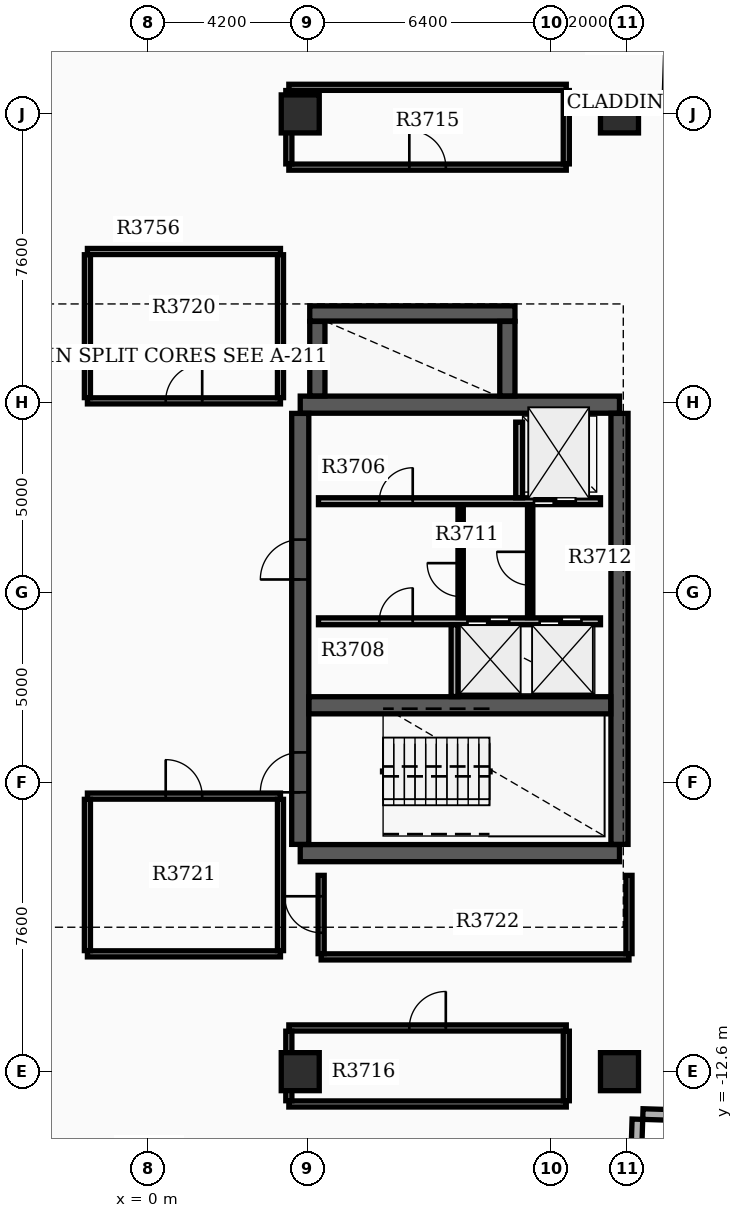
"""IFC4 building model, lengths in metres.
Left out: names, types, materials, properties, quantities, classifications, styles, units other than length and angle.
Written with IfcOpenShell. Run it as: python <this file> out.ifc"""

import sys

from ifc_helpers import new_model, si_unit, direction, frame, frame_2d, origin, origin_2d, place, context, subcontext, project, spatial, rectangle, extrude, element, fill, save


model = new_model("IFC4")
c1 = context("Model", 3, precision=1e-05, world=origin(), true_north=direction((0.0, 1.0)))
c2 = subcontext(c1, "Body", "Model", "MODEL_VIEW")
j1 = project(units=[si_unit("LENGTHUNIT", "METRE"), si_unit("PLANEANGLEUNIT", "RADIAN")], contexts=[c1])
p1 = place(None, origin())
s1 = spatial("IfcSite", under=j1, at=p1, CompositionType="ELEMENT")
p2 = place(p1, origin())
s2 = spatial("IfcBuilding", under=s1, at=p2, CompositionType="ELEMENT")
p3 = place(p2, frame((0.0, 0.0, 232.5)))
s3 = spatial("IfcBuildingStorey", under=s2, at=p3, CompositionType="ELEMENT", Elevation=232.5)
for number, where, z_axis, x_axis in (
    (1, (4.0, -6.85, 0.0), (0.0, 0.0, 1.0), (1.0, 0.0, 0.0)),
    (2, (4.0, 4.95, 0.0), (0.0, 0.0, 1.0), (1.0, 0.0, 0.0)),
):
    element("IfcWall", number, at=place(p3, frame(where, z_axis=z_axis, x_axis=x_axis)), inside=s3, PredefinedType="SHEAR", context=c2, shape_type="SweptSolid", body=[
        extrude(rectangle(XDim=8.4, YDim=0.45, at=frame_2d((4.2, 0.0))), origin(), (0.0, 0.0, 1.0), 3.7),
    ])
p4 = place(p3, frame((4.0, -6.62, 0.0), z_axis=(0.0, 0.0, 1.0), x_axis=(0.0, 1.0, 0.0)))
e3 = element("IfcWall", 3, at=p4, inside=s3, PredefinedType="SHEAR", context=c2, shape_type="SweptSolid", body=[
    extrude(rectangle(XDim=11.34, YDim=0.45, at=frame_2d((5.67, 0.0))), origin(), (0.0, 0.0, 1.0), 3.7),
])
p5 = place(p4, frame((1.37, 0.0, 0.0)))
e4 = element("IfcOpeningElement", 4, at=p5, cuts=e3, PredefinedType="OPENING", context=c2, shape_type="SweptSolid", body=[
    extrude(rectangle(XDim=1.05, YDim=2.15, at=frame_2d((0.525, 1.075))), frame((0.0, 0.235, 0.0), z_axis=(0.0, -1.0, 0.0), x_axis=(1.0, 0.0, 0.0)), (0.0, 0.0, 1.0), 0.47),
])
p6 = place(p4, frame((6.97, 0.0, 0.0)))
e5 = element("IfcOpeningElement", 5, at=p6, cuts=e3, PredefinedType="OPENING", context=c2, shape_type="SweptSolid", body=[
    extrude(rectangle(XDim=1.05, YDim=2.15, at=frame_2d((0.525, 1.075))), frame((0.0, 0.235, 0.0), z_axis=(0.0, -1.0, 0.0), x_axis=(1.0, 0.0, 0.0)), (0.0, 0.0, 1.0), 0.47),
])
p7 = place(p3, frame((12.4, -6.62, 0.0), z_axis=(0.0, 0.0, 1.0), x_axis=(0.0, 1.0, 0.0)))
e6 = element("IfcWall", 6, at=p7, inside=s3, PredefinedType="SHEAR", context=c2, shape_type="SweptSolid", body=[
    extrude(rectangle(XDim=11.34, YDim=0.45, at=frame_2d((5.67, 0.0))), origin(), (0.0, 0.0, 1.0), 3.7),
])
p8 = place(p3, frame((4.23, -2.96, 0.0), z_axis=(0.0, 0.0, 1.0), x_axis=(1.0, 0.0, 0.0)))
e7 = element("IfcWall", 7, at=p8, inside=s3, PredefinedType="SHEAR", context=c2, shape_type="SweptSolid", body=[
    extrude(rectangle(XDim=7.94, YDim=0.45, at=frame_2d((3.97, 0.0))), origin(), (0.0, 0.0, 1.0), 3.7),
])
p9 = place(p3, frame((4.45, 5.18, 0.0), z_axis=(0.0, 0.0, 1.0), x_axis=(0.0, 1.0, 0.0)))
e8 = element("IfcWall", 8, at=p9, inside=s3, PredefinedType="SHEAR", context=c2, shape_type="SweptSolid", body=[
    extrude(rectangle(XDim=1.96, YDim=0.4, at=frame_2d((0.98, 0.0))), origin(), (0.0, 0.0, 1.0), 3.7),
])
p10 = place(p3, frame((4.25, 7.35, 0.0), z_axis=(0.0, 0.0, 1.0), x_axis=(1.0, 0.0, 0.0)))
e9 = element("IfcWall", 9, at=p10, inside=s3, PredefinedType="SHEAR", context=c2, shape_type="SweptSolid", body=[
    extrude(rectangle(XDim=5.4, YDim=0.4, at=frame_2d((2.7, 0.0))), origin(), (0.0, 0.0, 1.0), 3.7),
])
p11 = place(p3, frame((9.45, 5.18, 0.0), z_axis=(0.0, 0.0, 1.0), x_axis=(0.0, 1.0, 0.0)))
e10 = element("IfcWall", 10, at=p11, inside=s3, PredefinedType="SHEAR", context=c2, shape_type="SweptSolid", body=[
    extrude(rectangle(XDim=1.96, YDim=0.4, at=frame_2d((0.98, 0.0))), origin(), (0.0, 0.0, 1.0), 3.7),
])
for number, where, z_axis, x_axis in (
    (11, (12.4, -12.6, 0.0), (0.0, 0.0, 1.0), (1.0, 0.0, 0.0)),
    (12, (12.4, 12.6, 0.0), (0.0, 0.0, 1.0), (1.0, 0.0, 0.0)),
    (13, (4.0, -12.6, 0.0), (0.0, 0.0, 1.0), (1.0, 0.0, 0.0)),
    (14, (4.0, 12.6, 0.0), (0.0, 0.0, 1.0), (1.0, 0.0, 0.0)),
):
    element("IfcColumn", number, at=place(p3, frame(where, z_axis=z_axis, x_axis=x_axis)), inside=s3, PredefinedType="COLUMN", context=c2, shape_type="SweptSolid", body=[
        extrude(rectangle(XDim=1.0, YDim=1.0, at=origin_2d()), origin(), (0.0, 0.0, 1.0), 3.9),
    ])
p12 = place(p3, frame((14.235, -13.754, 0.0), z_axis=(0.0, 0.0, 1.0), x_axis=(-0.999506398264, 0.031415916822, 0.0)))
e15 = element("IfcWall", 15, at=p12, inside=s3, PredefinedType="STANDARD", context=c2, shape_type="SweptSolid", body=[
    extrude(rectangle(XDim=1.22, YDim=0.28, at=frame_2d((0.61, 0.0))), origin(), (0.0, 0.0, 1.0), 3.18),
])
p13 = place(p3, frame((12.871, -13.851, 0.0), z_axis=(0.0, 0.0, 1.0), x_axis=(-0.031412596484, -0.999506502621, 0.0)))
e16 = element("IfcWall", 16, at=p13, inside=s3, PredefinedType="STANDARD", context=c2, shape_type="SweptSolid", body=[
    extrude(rectangle(XDim=1.5, YDim=0.28, at=frame_2d((0.75, 0.0))), origin(), (0.0, 0.0, 1.0), 3.18),
])
p14 = place(p3, frame((4.48, 2.41, 0.0), z_axis=(0.0, 0.0, 1.0), x_axis=(1.0, 0.0, 0.0)))
e17 = element("IfcWall", 17, at=p14, inside=s3, PredefinedType="SOLIDWALL", context=c2, shape_type="SweptSolid", body=[
    extrude(rectangle(XDim=7.42, YDim=0.18, at=frame_2d((3.71, 0.0))), origin(), (0.0, 0.0, 1.0), 3.17),
])
p15 = place(p14, frame((5.67, 0.0, 0.0)))
e18 = element("IfcOpeningElement", 18, at=p15, cuts=e17, PredefinedType="OPENING", context=c2, shape_type="SweptSolid", body=[
    extrude(rectangle(XDim=1.1, YDim=2.15, at=frame_2d((0.55, 1.075))), frame((0.0, 0.1, 0.0), z_axis=(0.0, -1.0, 0.0), x_axis=(1.0, 0.0, 0.0)), (0.0, 0.0, 1.0), 0.2),
])
p16 = place(p14, frame((1.6, 0.0, 0.0)))
e19 = element("IfcOpeningElement", 19, at=p16, cuts=e17, PredefinedType="OPENING", context=c2, shape_type="SweptSolid", body=[
    extrude(rectangle(XDim=0.88, YDim=2.1, at=frame_2d((0.44, 1.05))), frame((0.0, 0.1, 0.0), z_axis=(0.0, -1.0, 0.0), x_axis=(1.0, 0.0, 0.0)), (0.0, 0.0, 1.0), 0.2),
])
p17 = place(p3, frame((4.48, -0.75, 0.0), z_axis=(0.0, 0.0, 1.0), x_axis=(1.0, 0.0, 0.0)))
e20 = element("IfcWall", 20, at=p17, inside=s3, PredefinedType="SOLIDWALL", context=c2, shape_type="SweptSolid", body=[
    extrude(rectangle(XDim=7.42, YDim=0.18, at=frame_2d((3.71, 0.0))), origin(), (0.0, 0.0, 1.0), 3.17),
])
p18 = place(p17, frame((3.92, 0.0, 0.0)))
e21 = element("IfcOpeningElement", 21, at=p18, cuts=e20, PredefinedType="OPENING", context=c2, shape_type="SweptSolid", body=[
    extrude(rectangle(XDim=1.1, YDim=2.15, at=frame_2d((0.55, 1.075))), frame((0.0, 0.1, 0.0), z_axis=(0.0, -1.0, 0.0), x_axis=(1.0, 0.0, 0.0)), (0.0, 0.0, 1.0), 0.2),
])
p19 = place(p17, frame((5.82, 0.0, 0.0)))
e22 = element("IfcOpeningElement", 22, at=p19, cuts=e20, PredefinedType="OPENING", context=c2, shape_type="SweptSolid", body=[
    extrude(rectangle(XDim=1.1, YDim=2.15, at=frame_2d((0.55, 1.075))), frame((0.0, 0.1, 0.0), z_axis=(0.0, -1.0, 0.0), x_axis=(1.0, 0.0, 0.0)), (0.0, 0.0, 1.0), 0.2),
])
p20 = place(p17, frame((1.6, 0.0, 0.0)))
e23 = element("IfcOpeningElement", 23, at=p20, cuts=e20, PredefinedType="OPENING", context=c2, shape_type="SweptSolid", body=[
    extrude(rectangle(XDim=0.88, YDim=2.1, at=frame_2d((0.44, 1.05))), frame((0.0, 0.1, 0.0), z_axis=(0.0, -1.0, 0.0), x_axis=(1.0, 0.0, 0.0)), (0.0, 0.0, 1.0), 0.2),
])
p21 = place(p3, frame((9.76, 2.5, 0.0), z_axis=(0.0, 0.0, 1.0), x_axis=(0.0, 1.0, 0.0)))
e24 = element("IfcWall", 24, at=p21, inside=s3, PredefinedType="SOLIDWALL", context=c2, shape_type="SweptSolid", body=[
    extrude(rectangle(XDim=1.99, YDim=0.18, at=frame_2d((0.995, 0.0))), origin(), (0.0, 0.0, 1.0), 3.17),
])
p22 = place(p3, frame((8.06, -2.73, 0.0), z_axis=(0.0, 0.0, 1.0), x_axis=(0.0, 1.0, 0.0)))
e25 = element("IfcWall", 25, at=p22, inside=s3, PredefinedType="SOLIDWALL", context=c2, shape_type="SweptSolid", body=[
    extrude(rectangle(XDim=1.89, YDim=0.18, at=frame_2d((0.945, 0.0))), origin(), (0.0, 0.0, 1.0), 3.17),
])
p23 = place(p3, frame((8.22, -0.65, 0.0), z_axis=(0.0, 0.0, 1.0), x_axis=(0.0, 1.0, 0.0)))
e26 = element("IfcWall", 26, at=p23, inside=s3, PredefinedType="SOLIDWALL", context=c2, shape_type="SweptSolid", body=[
    extrude(rectangle(XDim=2.96, YDim=0.14, at=frame_2d((1.48, 0.0))), origin(), (0.0, 0.0, 1.0), 3.17),
])
p24 = place(p23, frame((0.55, 0.0, 0.0)))
e27 = element("IfcOpeningElement", 27, at=p24, cuts=e26, PredefinedType="OPENING", context=c2, shape_type="SweptSolid", body=[
    extrude(rectangle(XDim=0.88, YDim=2.1, at=frame_2d((0.44, 1.05))), frame((0.0, 0.08, 0.0), z_axis=(0.0, -1.0, 0.0), x_axis=(1.0, 0.0, 0.0)), (0.0, 0.0, 1.0), 0.16),
])
p25 = place(p3, frame((10.05, -0.652, 0.0), z_axis=(0.0, 0.0, 1.0), x_axis=(0.0, 1.0, 0.0)))
e28 = element("IfcWall", 28, at=p25, inside=s3, PredefinedType="PARTITIONING", context=c2, shape_type="SweptSolid", body=[
    extrude(rectangle(XDim=2.962, YDim=0.14, at=frame_2d((1.481, 0.0))), origin(), (0.0, 0.0, 1.0), 3.17),
])
p26 = place(p25, frame((0.85, 0.0, 0.0)))
e29 = element("IfcOpeningElement", 29, at=p26, cuts=e28, PredefinedType="OPENING", context=c2, shape_type="SweptSolid", body=[
    extrude(rectangle(XDim=0.88, YDim=2.1, at=frame_2d((0.44, 1.05))), frame((0.0, 0.08, 0.0), z_axis=(0.0, -1.0, 0.0), x_axis=(1.0, 0.0, 0.0)), (0.0, 0.0, 1.0), 0.16),
])
p27 = place(p3, frame((3.7, 11.2, 0.0), z_axis=(0.0, 0.0, 1.0), x_axis=(1.0, 0.0, 0.0)))
e30 = element("IfcWall", 30, at=p27, inside=s3, PredefinedType="PARTITIONING", context=c2, shape_type="SweptSolid", body=[
    extrude(rectangle(XDim=7.3, YDim=0.16, at=frame_2d((3.65, 0.0))), origin(), (0.0, 0.0, 1.0), 3.17),
])
p28 = place(p27, frame((3.17, 0.0, 0.0)))
e31 = element("IfcOpeningElement", 31, at=p28, cuts=e30, PredefinedType="OPENING", context=c2, shape_type="SweptSolid", body=[
    extrude(rectangle(XDim=0.96, YDim=2.15, at=frame_2d((0.48, 1.075))), frame((0.0, 0.09, 0.0), z_axis=(0.0, -1.0, 0.0), x_axis=(1.0, 0.0, 0.0)), (0.0, 0.0, 1.0), 0.18),
])
p29 = place(p3, frame((3.7, 13.3, 0.0), z_axis=(0.0, 0.0, 1.0), x_axis=(1.0, 0.0, 0.0)))
e32 = element("IfcWall", 32, at=p29, inside=s3, PredefinedType="PARTITIONING", context=c2, shape_type="SweptSolid", body=[
    extrude(rectangle(XDim=7.3, YDim=0.16, at=frame_2d((3.65, 0.0))), origin(), (0.0, 0.0, 1.0), 3.17),
])
for number, where, z_axis, x_axis in (
    (33, (3.7, 11.285, 0.0), (0.0, 0.0, 1.0), (0.0, 1.0, 0.0)),
    (34, (11.0, 11.285, 0.0), (0.0, 0.0, 1.0), (0.0, 1.0, 0.0)),
):
    element("IfcWall", number, at=place(p3, frame(where, z_axis=z_axis, x_axis=x_axis)), inside=s3, PredefinedType="PARTITIONING", context=c2, shape_type="SweptSolid", body=[
        extrude(rectangle(XDim=1.93, YDim=0.16, at=frame_2d((0.965, 0.0))), origin(), (0.0, 0.0, 1.0), 3.17),
    ])
p30 = place(p3, frame((3.7, -13.45, 0.0), z_axis=(0.0, 0.0, 1.0), x_axis=(1.0, 0.0, 0.0)))
e35 = element("IfcWall", 35, at=p30, inside=s3, PredefinedType="PARTITIONING", context=c2, shape_type="SweptSolid", body=[
    extrude(rectangle(XDim=7.3, YDim=0.16, at=frame_2d((3.65, 0.0))), origin(), (0.0, 0.0, 1.0), 3.17),
])
p31 = place(p3, frame((3.7, -11.45, 0.0), z_axis=(0.0, 0.0, 1.0), x_axis=(1.0, 0.0, 0.0)))
e36 = element("IfcWall", 36, at=p31, inside=s3, PredefinedType="PARTITIONING", context=c2, shape_type="SweptSolid", body=[
    extrude(rectangle(XDim=7.3, YDim=0.16, at=frame_2d((3.65, 0.0))), origin(), (0.0, 0.0, 1.0), 3.17),
])
p32 = place(p31, frame((3.17, 0.0, 0.0)))
e37 = element("IfcOpeningElement", 37, at=p32, cuts=e36, PredefinedType="OPENING", context=c2, shape_type="SweptSolid", body=[
    extrude(rectangle(XDim=0.96, YDim=2.15, at=frame_2d((0.48, 1.075))), frame((0.0, 0.09, 0.0), z_axis=(0.0, -1.0, 0.0), x_axis=(1.0, 0.0, 0.0)), (0.0, 0.0, 1.0), 0.18),
])
for number, where, z_axis, x_axis in (
    (38, (3.7, -13.365, 0.0), (0.0, 0.0, 1.0), (0.0, 1.0, 0.0)),
    (39, (11.0, -13.365, 0.0), (0.0, 0.0, 1.0), (0.0, 1.0, 0.0)),
):
    element("IfcWall", number, at=place(p3, frame(where, z_axis=z_axis, x_axis=x_axis)), inside=s3, PredefinedType="PARTITIONING", context=c2, shape_type="SweptSolid", body=[
        extrude(rectangle(XDim=1.83, YDim=0.16, at=frame_2d((0.915, 0.0))), origin(), (0.0, 0.0, 1.0), 3.17),
    ])
p33 = place(p3, frame((-1.6, 5.05, 0.0), z_axis=(0.0, 0.0, 1.0), x_axis=(1.0, 0.0, 0.0)))
e40 = element("IfcWall", 40, at=p33, inside=s3, PredefinedType="PARTITIONING", context=c2, shape_type="SweptSolid", body=[
    extrude(rectangle(XDim=5.08, YDim=0.16, at=frame_2d((2.54, 0.0))), origin(), (0.0, 0.0, 1.0), 3.17),
])
p34 = place(p33, frame((2.06, 0.0, 0.0)))
e41 = element("IfcOpeningElement", 41, at=p34, cuts=e40, PredefinedType="OPENING", context=c2, shape_type="SweptSolid", body=[
    extrude(rectangle(XDim=0.96, YDim=2.15, at=frame_2d((0.48, 1.075))), frame((0.0, 0.09, 0.0), z_axis=(0.0, -1.0, 0.0), x_axis=(1.0, 0.0, 0.0)), (0.0, 0.0, 1.0), 0.18),
])
p35 = place(p3, frame((-1.6, 8.98, 0.0), z_axis=(0.0, 0.0, 1.0), x_axis=(1.0, 0.0, 0.0)))
e42 = element("IfcWall", 42, at=p35, inside=s3, PredefinedType="PARTITIONING", context=c2, shape_type="SweptSolid", body=[
    extrude(rectangle(XDim=5.08, YDim=0.16, at=frame_2d((2.54, 0.0))), origin(), (0.0, 0.0, 1.0), 3.17),
])
for number, where, z_axis, x_axis in (
    (43, (-1.6, 5.135, 0.0), (0.0, 0.0, 1.0), (0.0, 1.0, 0.0)),
    (44, (3.48, 5.135, 0.0), (0.0, 0.0, 1.0), (0.0, 1.0, 0.0)),
):
    element("IfcWall", number, at=place(p3, frame(where, z_axis=z_axis, x_axis=x_axis)), inside=s3, PredefinedType="PARTITIONING", context=c2, shape_type="SweptSolid", body=[
        extrude(rectangle(XDim=3.76, YDim=0.16, at=frame_2d((1.88, 0.0))), origin(), (0.0, 0.0, 1.0), 3.17),
    ])
p36 = place(p3, frame((-1.6, -9.5, 0.0), z_axis=(0.0, 0.0, 1.0), x_axis=(1.0, 0.0, 0.0)))
e45 = element("IfcWall", 45, at=p36, inside=s3, PredefinedType="PARTITIONING", context=c2, shape_type="SweptSolid", body=[
    extrude(rectangle(XDim=5.08, YDim=0.16, at=frame_2d((2.54, 0.0))), origin(), (0.0, 0.0, 1.0), 3.17),
])
p37 = place(p3, frame((-1.6, -5.35, 0.0), z_axis=(0.0, 0.0, 1.0), x_axis=(1.0, 0.0, 0.0)))
e46 = element("IfcWall", 46, at=p37, inside=s3, PredefinedType="PARTITIONING", context=c2, shape_type="SweptSolid", body=[
    extrude(rectangle(XDim=5.08, YDim=0.16, at=frame_2d((2.54, 0.0))), origin(), (0.0, 0.0, 1.0), 3.17),
])
p38 = place(p37, frame((2.06, 0.0, 0.0)))
e47 = element("IfcOpeningElement", 47, at=p38, cuts=e46, PredefinedType="OPENING", context=c2, shape_type="SweptSolid", body=[
    extrude(rectangle(XDim=0.96, YDim=2.15, at=frame_2d((0.48, 1.075))), frame((0.0, 0.09, 0.0), z_axis=(0.0, -1.0, 0.0), x_axis=(1.0, 0.0, 0.0)), (0.0, 0.0, 1.0), 0.18),
])
for number, where, z_axis, x_axis in (
    (48, (-1.6, -9.415, 0.0), (0.0, 0.0, 1.0), (0.0, 1.0, 0.0)),
    (49, (3.48, -9.415, 0.0), (0.0, 0.0, 1.0), (0.0, 1.0, 0.0)),
):
    element("IfcWall", number, at=place(p3, frame(where, z_axis=z_axis, x_axis=x_axis)), inside=s3, PredefinedType="PARTITIONING", context=c2, shape_type="SweptSolid", body=[
        extrude(rectangle(XDim=3.98, YDim=0.16, at=frame_2d((1.99, 0.0))), origin(), (0.0, 0.0, 1.0), 3.17),
    ])
p39 = place(p3, frame((4.55, -9.58, 0.0), z_axis=(0.0, 0.0, 1.0), x_axis=(1.0, 0.0, 0.0)))
e50 = element("IfcWall", 50, at=p39, inside=s3, PredefinedType="PARTITIONING", context=c2, shape_type="SweptSolid", body=[
    extrude(rectangle(XDim=8.1, YDim=0.16, at=frame_2d((4.05, 0.0))), origin(), (0.0, 0.0, 1.0), 3.17),
])
p40 = place(p3, frame((4.55, -9.495, 0.0), z_axis=(0.0, 0.0, 1.0), x_axis=(0.0, 1.0, 0.0)))
e51 = element("IfcWall", 51, at=p40, inside=s3, PredefinedType="PARTITIONING", context=c2, shape_type="SweptSolid", body=[
    extrude(rectangle(XDim=2.06, YDim=0.16, at=frame_2d((1.03, 0.0))), origin(), (0.0, 0.0, 1.0), 3.17),
])
p41 = place(p40, frame((0.55, 0.0, 0.0)))
e52 = element("IfcOpeningElement", 52, at=p41, cuts=e51, PredefinedType="OPENING", context=c2, shape_type="SweptSolid", body=[
    extrude(rectangle(XDim=0.96, YDim=2.15, at=frame_2d((0.48, 1.075))), frame((0.0, 0.09, 0.0), z_axis=(0.0, -1.0, 0.0), x_axis=(1.0, 0.0, 0.0)), (0.0, 0.0, 1.0), 0.18),
])
p42 = place(p3, frame((12.65, -9.495, 0.0), z_axis=(0.0, 0.0, 1.0), x_axis=(0.0, 1.0, 0.0)))
e53 = element("IfcWall", 53, at=p42, inside=s3, PredefinedType="PARTITIONING", context=c2, shape_type="SweptSolid", body=[
    extrude(rectangle(XDim=2.06, YDim=0.16, at=frame_2d((1.03, 0.0))), origin(), (0.0, 0.0, 1.0), 3.17),
])
p43 = place(p5, origin())
e54 = element("IfcDoor", 54, at=p43, inside=s3, OperationType="SINGLE_SWING_LEFT", PredefinedType="DOOR", context=c2, shape_type="SweptSolid", body=[
    extrude(rectangle(XDim=1.05, YDim=2.15, at=frame_2d((0.525, 1.075))), frame((0.0, 0.025, 0.0), z_axis=(0.0, -1.0, 0.0), x_axis=(1.0, 0.0, 0.0)), (0.0, 0.0, 1.0), 0.05),
])
fill(e4, e54)
p44 = place(p6, origin())
e55 = element("IfcDoor", 55, at=p44, inside=s3, OperationType="SINGLE_SWING_LEFT", PredefinedType="DOOR", context=c2, shape_type="SweptSolid", body=[
    extrude(rectangle(XDim=1.05, YDim=2.15, at=frame_2d((0.525, 1.075))), frame((0.0, 0.025, 0.0), z_axis=(0.0, -1.0, 0.0), x_axis=(1.0, 0.0, 0.0)), (0.0, 0.0, 1.0), 0.05),
])
fill(e5, e55)
p45 = place(p15, origin())
e56 = element("IfcDoor", 56, at=p45, inside=s3, OperationType="DOUBLE_DOOR_SLIDING", PredefinedType="DOOR", context=c2, shape_type="SweptSolid", body=[
    extrude(rectangle(XDim=1.1, YDim=2.15, at=frame_2d((0.55, 1.075))), frame((0.0, 0.025, 0.0), z_axis=(0.0, -1.0, 0.0), x_axis=(1.0, 0.0, 0.0)), (0.0, 0.0, 1.0), 0.05),
])
fill(e18, e56)
p46 = place(p18, origin())
e57 = element("IfcDoor", 57, at=p46, inside=s3, OperationType="DOUBLE_DOOR_SLIDING", PredefinedType="DOOR", context=c2, shape_type="SweptSolid", body=[
    extrude(rectangle(XDim=1.1, YDim=2.15, at=frame_2d((0.55, 1.075))), frame((0.0, 0.025, 0.0), z_axis=(0.0, -1.0, 0.0), x_axis=(1.0, 0.0, 0.0)), (0.0, 0.0, 1.0), 0.05),
])
fill(e21, e57)
p47 = place(p19, origin())
e58 = element("IfcDoor", 58, at=p47, inside=s3, OperationType="DOUBLE_DOOR_SLIDING", PredefinedType="DOOR", context=c2, shape_type="SweptSolid", body=[
    extrude(rectangle(XDim=1.1, YDim=2.15, at=frame_2d((0.55, 1.075))), frame((0.0, 0.025, 0.0), z_axis=(0.0, -1.0, 0.0), x_axis=(1.0, 0.0, 0.0)), (0.0, 0.0, 1.0), 0.05),
])
fill(e22, e58)
p48 = place(p16, origin())
e59 = element("IfcDoor", 59, at=p48, inside=s3, OperationType="SINGLE_SWING_RIGHT", PredefinedType="DOOR", context=c2, shape_type="SweptSolid", body=[
    extrude(rectangle(XDim=0.88, YDim=2.1, at=frame_2d((0.44, 1.05))), frame((0.0, 0.025, 0.0), z_axis=(0.0, -1.0, 0.0), x_axis=(1.0, 0.0, 0.0)), (0.0, 0.0, 1.0), 0.05),
])
fill(e19, e59)
p49 = place(p20, origin())
e60 = element("IfcDoor", 60, at=p49, inside=s3, OperationType="SINGLE_SWING_RIGHT", PredefinedType="DOOR", context=c2, shape_type="SweptSolid", body=[
    extrude(rectangle(XDim=0.88, YDim=2.1, at=frame_2d((0.44, 1.05))), frame((0.0, 0.025, 0.0), z_axis=(0.0, -1.0, 0.0), x_axis=(1.0, 0.0, 0.0)), (0.0, 0.0, 1.0), 0.05),
])
fill(e23, e60)
p50 = place(p24, origin())
e61 = element("IfcDoor", 61, at=p50, inside=s3, OperationType="SINGLE_SWING_RIGHT", PredefinedType="DOOR", context=c2, shape_type="SweptSolid", body=[
    extrude(rectangle(XDim=0.88, YDim=2.1, at=frame_2d((0.44, 1.05))), frame((0.0, 0.025, 0.0), z_axis=(0.0, -1.0, 0.0), x_axis=(1.0, 0.0, 0.0)), (0.0, 0.0, 1.0), 0.05),
])
fill(e27, e61)
p51 = place(p26, origin())
e62 = element("IfcDoor", 62, at=p51, inside=s3, OperationType="SINGLE_SWING_RIGHT", PredefinedType="DOOR", context=c2, shape_type="SweptSolid", body=[
    extrude(rectangle(XDim=0.88, YDim=2.1, at=frame_2d((0.44, 1.05))), frame((0.0, 0.025, 0.0), z_axis=(0.0, -1.0, 0.0), x_axis=(1.0, 0.0, 0.0)), (0.0, 0.0, 1.0), 0.05),
])
fill(e29, e62)
p52 = place(p28, origin())
e63 = element("IfcDoor", 63, at=p52, inside=s3, OperationType="SINGLE_SWING_LEFT", PredefinedType="DOOR", context=c2, shape_type="SweptSolid", body=[
    extrude(rectangle(XDim=0.96, YDim=2.15, at=frame_2d((0.48, 1.075))), frame((0.0, 0.025, 0.0), z_axis=(0.0, -1.0, 0.0), x_axis=(1.0, 0.0, 0.0)), (0.0, 0.0, 1.0), 0.05),
])
fill(e31, e63)
p53 = place(p32, origin())
e64 = element("IfcDoor", 64, at=p53, inside=s3, OperationType="SINGLE_SWING_RIGHT", PredefinedType="DOOR", context=c2, shape_type="SweptSolid", body=[
    extrude(rectangle(XDim=0.96, YDim=2.15, at=frame_2d((0.48, 1.075))), frame((0.0, 0.025, 0.0), z_axis=(0.0, -1.0, 0.0), x_axis=(1.0, 0.0, 0.0)), (0.0, 0.0, 1.0), 0.05),
])
fill(e37, e64)
p54 = place(p34, origin())
e65 = element("IfcDoor", 65, at=p54, inside=s3, OperationType="SINGLE_SWING_RIGHT", PredefinedType="DOOR", context=c2, shape_type="SweptSolid", body=[
    extrude(rectangle(XDim=0.96, YDim=2.15, at=frame_2d((0.48, 1.075))), frame((0.0, 0.025, 0.0), z_axis=(0.0, -1.0, 0.0), x_axis=(1.0, 0.0, 0.0)), (0.0, 0.0, 1.0), 0.05),
])
fill(e41, e65)
p55 = place(p38, origin())
e66 = element("IfcDoor", 66, at=p55, inside=s3, OperationType="SINGLE_SWING_LEFT", PredefinedType="DOOR", context=c2, shape_type="SweptSolid", body=[
    extrude(rectangle(XDim=0.96, YDim=2.15, at=frame_2d((0.48, 1.075))), frame((0.0, 0.025, 0.0), z_axis=(0.0, -1.0, 0.0), x_axis=(1.0, 0.0, 0.0)), (0.0, 0.0, 1.0), 0.05),
])
fill(e47, e66)
p56 = place(p41, origin())
e67 = element("IfcDoor", 67, at=p56, inside=s3, OperationType="SINGLE_SWING_RIGHT", PredefinedType="DOOR", context=c2, shape_type="SweptSolid", body=[
    extrude(rectangle(XDim=0.96, YDim=2.15, at=frame_2d((0.48, 1.075))), frame((0.0, 0.025, 0.0), z_axis=(0.0, -1.0, 0.0), x_axis=(1.0, 0.0, 0.0)), (0.0, 0.0, 1.0), 0.05),
])
fill(e52, e67)
save(model, sys.argv[1])
